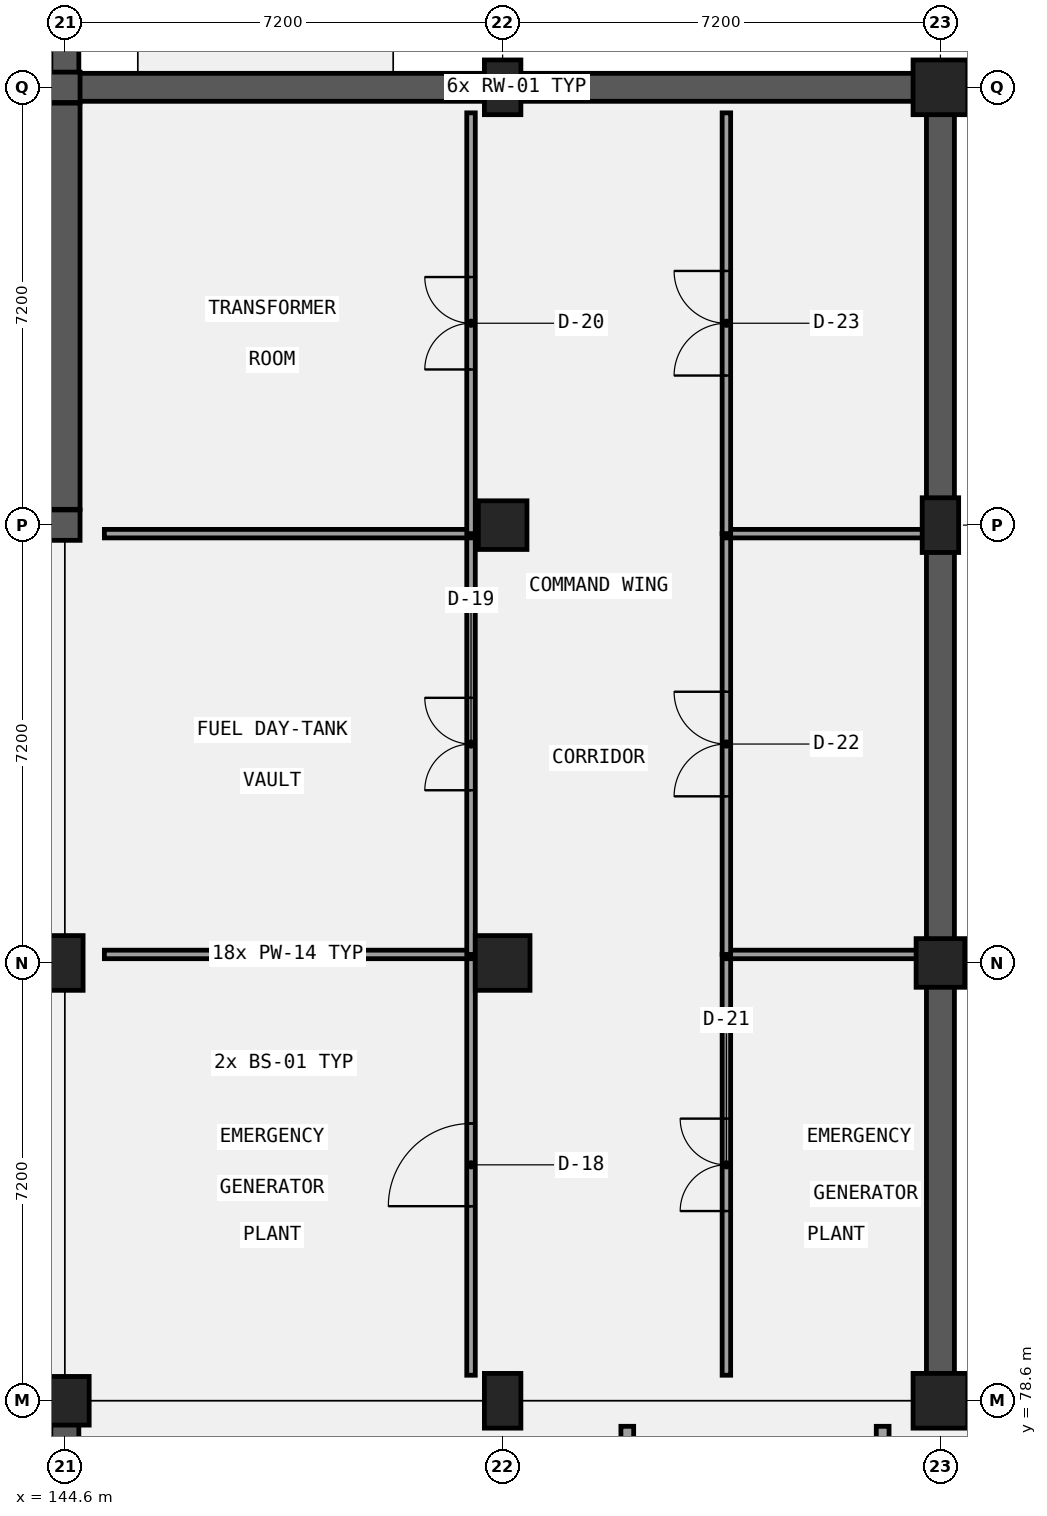
"""IFC4 building model, lengths in metres.
Left out: names, types, materials, properties, quantities, classifications, styles, units other than length and angle.
Written with IfcOpenShell. Run it as: python <this file> out.ifc"""

import sys

from ifc_helpers import new_model, si_unit, direction, frame, frame_2d, origin, origin_2d, place, context, subcontext, project, spatial, rectangle, extrude, element, fill, save


model = new_model("IFC4")
c1 = context("Model", 3, precision=1e-05, world=origin(), true_north=direction((0.0, 1.0)))
c2 = subcontext(c1, "Body", "Model", "MODEL_VIEW")
j1 = project(units=[si_unit("LENGTHUNIT", "METRE"), si_unit("PLANEANGLEUNIT", "RADIAN")], contexts=[c1])
p1 = place(None, origin())
s1 = spatial("IfcSite", under=j1, at=p1, CompositionType="ELEMENT")
p2 = place(p1, origin())
s2 = spatial("IfcBuilding", under=s1, at=p2, CompositionType="ELEMENT")
p3 = place(p2, frame((0.0, 0.0, -8.4)))
s3 = spatial("IfcBuildingStorey", under=s2, at=p3, CompositionType="ELEMENT", Elevation=-8.4)
p4 = place(p3, frame((144.83, 78.6, 0.0), z_axis=(0.0, 0.0, 1.0), x_axis=(-1.0, 0.0, 0.0)))
e1 = element("IfcWall", 1, at=p4, inside=s3, PredefinedType="USERDEFINED", context=c2, shape_type="SweptSolid", body=[
    extrude(rectangle(XDim=36.46, YDim=0.46, at=frame_2d((18.23, 0.0))), origin(), (0.0, 0.0, 1.0), 2.9),
])
p5 = place(p3, frame((144.6, 113.78, 0.0), z_axis=(0.0, 0.0, 1.0), x_axis=(0.0, -1.0, 0.0)))
e2 = element("IfcWall", 2, at=p5, inside=s3, PredefinedType="USERDEFINED", context=c2, shape_type="SweptSolid", body=[
    extrude(rectangle(XDim=13.35, YDim=0.46, at=frame_2d((6.675, 0.0))), origin(), (0.0, 0.0, 1.0), 3.25),
])
p6 = place(p3, frame((144.83, 100.2, 0.0), z_axis=(0.0, 0.0, 1.0), x_axis=(1.0, 0.0, 0.0)))
e3 = element("IfcWall", 3, at=p6, inside=s3, PredefinedType="USERDEFINED", context=c2, shape_type="SweptSolid", body=[
    extrude(rectangle(XDim=14.4, YDim=0.46, at=frame_2d((7.2, 0.0))), origin(), (0.0, 0.0, 1.0), 2.9),
])
p7 = place(p3, frame((159.0, 99.98, 0.0), z_axis=(0.0, 0.0, 1.0), x_axis=(0.0, -1.0, 0.0)))
e4 = element("IfcWall", 4, at=p7, inside=s3, PredefinedType="USERDEFINED", context=c2, shape_type="SweptSolid", body=[
    extrude(rectangle(XDim=21.16, YDim=0.46, at=frame_2d((10.58, 0.0))), origin(), (0.0, 0.0, 1.0), 3.25),
])
p8 = place(p3, frame((158.77, 78.6, 0.0), z_axis=(0.0, 0.0, 1.0), x_axis=(1.0, 0.0, 0.0)))
e5 = element("IfcWall", 5, at=p8, inside=s3, PredefinedType="USERDEFINED", context=c2, shape_type="SweptSolid", body=[
    extrude(rectangle(XDim=7.66, YDim=0.46, at=frame_2d((3.83, 0.0))), origin(), (0.0, 0.0, 1.0), 3.05),
])
p9 = place(p3, frame((144.6, 35.62, 0.0), z_axis=(0.0, 0.0, 1.0), x_axis=(0.0, 1.0, 0.0)))
e6 = element("IfcWall", 6, at=p9, inside=s3, PredefinedType="USERDEFINED", context=c2, shape_type="SweptSolid", body=[
    extrude(rectangle(XDim=42.76, YDim=0.46, at=frame_2d((21.38, 0.0))), origin(), (0.0, 0.0, 1.0), 3.05),
])
p10 = place(p3, frame((129.95, 100.2, 0.0), z_axis=(0.0, 0.0, 1.0), x_axis=(1.0, 0.0, 0.0)))
e7 = element("IfcWall", 7, at=p10, inside=s3, PredefinedType="SHEAR", context=c2, shape_type="SweptSolid", body=[
    extrude(rectangle(XDim=14.9, YDim=0.5, at=frame_2d((7.45, 0.0))), origin(), (0.0, 0.0, 1.0), 4.2),
])
p11 = place(p3, frame((129.95, 93.0, 0.0), z_axis=(0.0, 0.0, 1.0), x_axis=(1.0, 0.0, 0.0)))
e8 = element("IfcWall", 8, at=p11, inside=s3, PredefinedType="SHEAR", context=c2, shape_type="SweptSolid", body=[
    extrude(rectangle(XDim=14.9, YDim=0.5, at=frame_2d((7.45, 0.0))), origin(), (0.0, 0.0, 1.0), 4.2),
])
p12 = place(p11, frame((3.8, 0.0, 0.0)))
e9 = element("IfcOpeningElement", 9, at=p12, cuts=e8, PredefinedType="OPENING", context=c2, shape_type="SweptSolid", body=[
    extrude(rectangle(XDim=1.3, YDim=2.2, at=frame_2d((0.65, 1.1))), frame((0.0, 0.26, 0.0), z_axis=(0.0, -1.0, 0.0), x_axis=(1.0, 0.0, 0.0)), (0.0, 0.0, 1.0), 0.52),
])
p13 = place(p11, frame((11.8, 0.0, 0.0)))
e10 = element("IfcOpeningElement", 10, at=p13, cuts=e8, PredefinedType="OPENING", context=c2, shape_type="SweptSolid", body=[
    extrude(rectangle(XDim=1.3, YDim=2.2, at=frame_2d((0.65, 1.1))), frame((0.0, 0.26, 0.0), z_axis=(0.0, -1.0, 0.0), x_axis=(1.0, 0.0, 0.0)), (0.0, 0.0, 1.0), 0.52),
])
p14 = place(p3, frame((144.6, 93.26, 0.0), z_axis=(0.0, 0.0, 1.0), x_axis=(0.0, 1.0, 0.0)))
e11 = element("IfcWall", 11, at=p14, inside=s3, PredefinedType="SHEAR", context=c2, shape_type="SweptSolid", body=[
    extrude(rectangle(XDim=6.68, YDim=0.5, at=frame_2d((3.34, 0.0))), origin(), (0.0, 0.0, 1.0), 4.2),
])
p15 = place(p3, frame((144.6, 78.6, 0.0), z_axis=(0.0, 0.0, 1.0), x_axis=(1.0, 0.0, 0.0)))
e12 = element("IfcColumn", 12, at=p15, inside=s3, PredefinedType="COLUMN", context=c2, shape_type="SweptSolid", body=[
    extrude(rectangle(XDim=0.8, YDim=0.8, at=origin_2d()), origin(), (0.0, 0.0, 1.0), 4.2),
])
for number, where, z_axis, x_axis in (
    (13, (144.6, 85.8, 0.0), (0.0, 0.0, 1.0), (1.0, 0.0, 0.0)),
    (14, (151.8, 78.6, 0.0), (0.0, 0.0, 1.0), (1.0, 0.0, 0.0)),
):
    element("IfcColumn", number, at=place(p3, frame(where, z_axis=z_axis, x_axis=x_axis)), inside=s3, PredefinedType="COLUMN", context=c2, shape_type="SweptSolid", body=[
        extrude(rectangle(XDim=0.6, YDim=0.9, at=origin_2d()), origin(), (0.0, 0.0, 1.0), 4.2),
    ])
p16 = place(p3, frame((151.8, 85.8, 0.0), z_axis=(0.0, 0.0, 1.0), x_axis=(1.0, 0.0, 0.0)))
e15 = element("IfcColumn", 15, at=p16, inside=s3, PredefinedType="COLUMN", context=c2, shape_type="SweptSolid", body=[
    extrude(rectangle(XDim=0.9, YDim=0.9, at=origin_2d()), origin(), (0.0, 0.0, 1.0), 4.2),
])
p17 = place(p3, frame((151.8, 93.0, 0.0), z_axis=(0.0, 0.0, 1.0), x_axis=(1.0, 0.0, 0.0)))
e16 = element("IfcColumn", 16, at=p17, inside=s3, PredefinedType="COLUMN", context=c2, shape_type="SweptSolid", body=[
    extrude(rectangle(XDim=0.8, YDim=0.8, at=origin_2d()), origin(), (0.0, 0.0, 1.0), 4.2),
])
p18 = place(p3, frame((151.8, 100.2, 0.0), z_axis=(0.0, 0.0, 1.0), x_axis=(1.0, 0.0, 0.0)))
e17 = element("IfcColumn", 17, at=p18, inside=s3, PredefinedType="COLUMN", context=c2, shape_type="SweptSolid", body=[
    extrude(rectangle(XDim=0.6, YDim=0.9, at=origin_2d()), origin(), (0.0, 0.0, 1.0), 4.2),
])
p19 = place(p3, frame((159.0, 78.6, 0.0), z_axis=(0.0, 0.0, 1.0), x_axis=(1.0, 0.0, 0.0)))
e18 = element("IfcColumn", 18, at=p19, inside=s3, PredefinedType="COLUMN", context=c2, shape_type="SweptSolid", body=[
    extrude(rectangle(XDim=0.9, YDim=0.9, at=origin_2d()), origin(), (0.0, 0.0, 1.0), 4.2),
])
p20 = place(p3, frame((159.0, 85.8, 0.0), z_axis=(0.0, 0.0, 1.0), x_axis=(1.0, 0.0, 0.0)))
e19 = element("IfcColumn", 19, at=p20, inside=s3, PredefinedType="COLUMN", context=c2, shape_type="SweptSolid", body=[
    extrude(rectangle(XDim=0.8, YDim=0.8, at=origin_2d()), origin(), (0.0, 0.0, 1.0), 4.2),
])
p21 = place(p3, frame((159.0, 93.0, 0.0), z_axis=(0.0, 0.0, 1.0), x_axis=(1.0, 0.0, 0.0)))
e20 = element("IfcColumn", 20, at=p21, inside=s3, PredefinedType="COLUMN", context=c2, shape_type="SweptSolid", body=[
    extrude(rectangle(XDim=0.6, YDim=0.9, at=origin_2d()), origin(), (0.0, 0.0, 1.0), 4.2),
])
p22 = place(p3, frame((159.0, 100.2, 0.0), z_axis=(0.0, 0.0, 1.0), x_axis=(1.0, 0.0, 0.0)))
e21 = element("IfcColumn", 21, at=p22, inside=s3, PredefinedType="COLUMN", context=c2, shape_type="SweptSolid", body=[
    extrude(rectangle(XDim=0.9, YDim=0.9, at=origin_2d()), origin(), (0.0, 0.0, 1.0), 4.2),
])
p23 = place(p3, frame((151.28, 79.02, 0.0), z_axis=(0.0, 0.0, 1.0), x_axis=(0.0, 1.0, 0.0)))
e22 = element("IfcWall", 22, at=p23, inside=s3, PredefinedType="PARTITIONING", context=c2, shape_type="SweptSolid", body=[
    extrude(rectangle(XDim=6.92, YDim=0.14, at=frame_2d((3.46, 0.0))), origin(), (0.0, 0.0, 1.0), 3.9),
])
p24 = place(p23, frame((2.78, 0.0, 0.0)))
e23 = element("IfcOpeningElement", 23, at=p24, cuts=e22, PredefinedType="OPENING", context=c2, shape_type="SweptSolid", body=[
    extrude(rectangle(XDim=1.36, YDim=2.35, at=frame_2d((0.68, 1.175))), frame((0.0, 0.08, 0.0), z_axis=(0.0, -1.0, 0.0), x_axis=(1.0, 0.0, 0.0)), (0.0, 0.0, 1.0), 0.16),
])
p25 = place(p3, frame((145.25, 85.94, 0.0), z_axis=(0.0, 0.0, 1.0), x_axis=(1.0, 0.0, 0.0)))
e24 = element("IfcWall", 24, at=p25, inside=s3, PredefinedType="PARTITIONING", context=c2, shape_type="SweptSolid", body=[
    extrude(rectangle(XDim=6.03, YDim=0.14, at=frame_2d((3.015, 0.0))), origin(), (0.0, 0.0, 1.0), 3.1),
])
p26 = place(p3, frame((151.28, 85.94, 0.0), z_axis=(0.0, 0.0, 1.0), x_axis=(0.0, 1.0, 0.0)))
e25 = element("IfcWall", 25, at=p26, inside=s3, PredefinedType="PARTITIONING", context=c2, shape_type="SweptSolid", body=[
    extrude(rectangle(XDim=6.92, YDim=0.14, at=frame_2d((3.46, 0.0))), origin(), (0.0, 0.0, 1.0), 3.9),
])
p27 = place(p26, frame((2.7, 0.0, 0.0)))
e26 = element("IfcOpeningElement", 26, at=p27, cuts=e25, PredefinedType="OPENING", context=c2, shape_type="SweptSolid", body=[
    extrude(rectangle(XDim=1.52, YDim=2.1, at=frame_2d((0.76, 1.05))), frame((0.0, 0.08, 0.0), z_axis=(0.0, -1.0, 0.0), x_axis=(1.0, 0.0, 0.0)), (0.0, 0.0, 1.0), 0.16),
])
p28 = place(p3, frame((145.25, 92.86, 0.0), z_axis=(0.0, 0.0, 1.0), x_axis=(1.0, 0.0, 0.0)))
e27 = element("IfcWall", 27, at=p28, inside=s3, PredefinedType="PARTITIONING", context=c2, shape_type="SweptSolid", body=[
    extrude(rectangle(XDim=6.03, YDim=0.14, at=frame_2d((3.015, 0.0))), origin(), (0.0, 0.0, 1.0), 3.05),
])
p29 = place(p3, frame((151.28, 92.86, 0.0), z_axis=(0.0, 0.0, 1.0), x_axis=(0.0, 1.0, 0.0)))
e28 = element("IfcWall", 28, at=p29, inside=s3, PredefinedType="PARTITIONING", context=c2, shape_type="SweptSolid", body=[
    extrude(rectangle(XDim=6.92, YDim=0.14, at=frame_2d((3.46, 0.0))), origin(), (0.0, 0.0, 1.0), 3.9),
])
p30 = place(p29, frame((2.7, 0.0, 0.0)))
e29 = element("IfcOpeningElement", 29, at=p30, cuts=e28, PredefinedType="OPENING", context=c2, shape_type="SweptSolid", body=[
    extrude(rectangle(XDim=1.52, YDim=2.22, at=frame_2d((0.76, 1.11))), frame((0.0, 0.08, 0.0), z_axis=(0.0, -1.0, 0.0), x_axis=(1.0, 0.0, 0.0)), (0.0, 0.0, 1.0), 0.16),
])
p31 = place(p3, frame((155.48, 79.02, 0.0), z_axis=(0.0, 0.0, 1.0), x_axis=(0.0, 1.0, 0.0)))
e30 = element("IfcWall", 30, at=p31, inside=s3, PredefinedType="PARTITIONING", context=c2, shape_type="SweptSolid", body=[
    extrude(rectangle(XDim=6.92, YDim=0.14, at=frame_2d((3.46, 0.0))), origin(), (0.0, 0.0, 1.0), 3.9),
])
p32 = place(p31, frame((2.7, 0.0, 0.0)))
e31 = element("IfcOpeningElement", 31, at=p32, cuts=e30, PredefinedType="OPENING", context=c2, shape_type="SweptSolid", body=[
    extrude(rectangle(XDim=1.52, YDim=2.35, at=frame_2d((0.76, 1.175))), frame((0.0, 0.08, 0.0), z_axis=(0.0, -1.0, 0.0), x_axis=(1.0, 0.0, 0.0)), (0.0, 0.0, 1.0), 0.16),
])
p33 = place(p3, frame((155.48, 85.94, 0.0), z_axis=(0.0, 0.0, 1.0), x_axis=(1.0, 0.0, 0.0)))
e32 = element("IfcWall", 32, at=p33, inside=s3, PredefinedType="PARTITIONING", context=c2, shape_type="SweptSolid", body=[
    extrude(rectangle(XDim=3.34, YDim=0.14, at=frame_2d((1.67, 0.0))), origin(), (0.0, 0.0, 1.0), 3.05),
])
p34 = place(p3, frame((155.48, 85.94, 0.0), z_axis=(0.0, 0.0, 1.0), x_axis=(0.0, 1.0, 0.0)))
e33 = element("IfcWall", 33, at=p34, inside=s3, PredefinedType="PARTITIONING", context=c2, shape_type="SweptSolid", body=[
    extrude(rectangle(XDim=6.92, YDim=0.14, at=frame_2d((3.46, 0.0))), origin(), (0.0, 0.0, 1.0), 3.9),
])
p35 = place(p34, frame((2.6, 0.0, 0.0)))
e34 = element("IfcOpeningElement", 34, at=p35, cuts=e33, PredefinedType="OPENING", context=c2, shape_type="SweptSolid", body=[
    extrude(rectangle(XDim=1.72, YDim=2.1, at=frame_2d((0.86, 1.05))), frame((0.0, 0.08, 0.0), z_axis=(0.0, -1.0, 0.0), x_axis=(1.0, 0.0, 0.0)), (0.0, 0.0, 1.0), 0.16),
])
p36 = place(p3, frame((155.48, 92.86, 0.0), z_axis=(0.0, 0.0, 1.0), x_axis=(1.0, 0.0, 0.0)))
e35 = element("IfcWall", 35, at=p36, inside=s3, PredefinedType="PARTITIONING", context=c2, shape_type="SweptSolid", body=[
    extrude(rectangle(XDim=3.34, YDim=0.14, at=frame_2d((1.67, 0.0))), origin(), (0.0, 0.0, 1.0), 3.0),
])
p37 = place(p3, frame((155.48, 92.86, 0.0), z_axis=(0.0, 0.0, 1.0), x_axis=(0.0, 1.0, 0.0)))
e36 = element("IfcWall", 36, at=p37, inside=s3, PredefinedType="PARTITIONING", context=c2, shape_type="SweptSolid", body=[
    extrude(rectangle(XDim=6.92, YDim=0.14, at=frame_2d((3.46, 0.0))), origin(), (0.0, 0.0, 1.0), 3.9),
])
p38 = place(p37, frame((2.6, 0.0, 0.0)))
e37 = element("IfcOpeningElement", 37, at=p38, cuts=e36, PredefinedType="OPENING", context=c2, shape_type="SweptSolid", body=[
    extrude(rectangle(XDim=1.72, YDim=2.22, at=frame_2d((0.86, 1.11))), frame((0.0, 0.08, 0.0), z_axis=(0.0, -1.0, 0.0), x_axis=(1.0, 0.0, 0.0)), (0.0, 0.0, 1.0), 0.16),
])
p39 = place(p3, frame((153.85, 71.248, 0.0), z_axis=(0.0, 0.0, 1.0), x_axis=(0.0, 1.0, 0.0)))
e38 = element("IfcWall", 38, at=p39, inside=s3, PredefinedType="PARTITIONING", context=c2, shape_type="SweptSolid", body=[
    extrude(rectangle(XDim=6.932, YDim=0.21, at=frame_2d((3.466, 0.0))), origin(), (0.0, 0.0, 1.0), 3.9),
])
p40 = place(p39, frame((3.006, 0.0, 0.0)))
e39 = element("IfcOpeningElement", 39, at=p40, cuts=e38, PredefinedType="OPENING", context=c2, shape_type="SweptSolid", body=[
    extrude(rectangle(XDim=0.92, YDim=2.35, at=frame_2d((0.46, 1.175))), frame((0.0, 0.115, 0.0), z_axis=(0.0, -1.0, 0.0), x_axis=(1.0, 0.0, 0.0)), (0.0, 0.0, 1.0), 0.23),
])
p41 = place(p3, frame((158.05, 72.634, 0.0), z_axis=(0.0, 0.0, 1.0), x_axis=(0.0, 1.0, 0.0)))
e40 = element("IfcWall", 40, at=p41, inside=s3, PredefinedType="PARTITIONING", context=c2, shape_type="SweptSolid", body=[
    extrude(rectangle(XDim=5.546, YDim=0.21, at=frame_2d((2.773, 0.0))), origin(), (0.0, 0.0, 1.0), 3.9),
])
p42 = place(p41, frame((2.253, 0.0, 0.0)))
e41 = element("IfcOpeningElement", 41, at=p42, cuts=e40, PredefinedType="OPENING", context=c2, shape_type="SweptSolid", body=[
    extrude(rectangle(XDim=1.04, YDim=2.1, at=frame_2d((0.52, 1.05))), frame((0.0, 0.115, 0.0), z_axis=(0.0, -1.0, 0.0), x_axis=(1.0, 0.0, 0.0)), (0.0, 0.0, 1.0), 0.23),
])
p43 = place(p24, frame((1.36, 0.0, 0.0), z_axis=(0.0, 0.0, 1.0), x_axis=(-1.0, 0.0, 0.0)))
e42 = element("IfcDoor", 42, at=p43, inside=s3, OperationType="SINGLE_SWING_LEFT", PredefinedType="DOOR", context=c2, shape_type="SweptSolid", body=[
    extrude(rectangle(XDim=1.36, YDim=2.35, at=frame_2d((0.68, 1.175))), frame((0.0, 0.025, 0.0), z_axis=(0.0, -1.0, 0.0), x_axis=(1.0, 0.0, 0.0)), (0.0, 0.0, 1.0), 0.05),
])
fill(e23, e42)
p44 = place(p27, frame((1.52, 0.0, 0.0), z_axis=(0.0, 0.0, 1.0), x_axis=(-1.0, 0.0, 0.0)))
e43 = element("IfcDoor", 43, at=p44, inside=s3, OperationType="DOUBLE_DOOR_SINGLE_SWING", PredefinedType="DOOR", context=c2, shape_type="SweptSolid", body=[
    extrude(rectangle(XDim=1.52, YDim=2.1, at=frame_2d((0.76, 1.05))), frame((0.0, 0.025, 0.0), z_axis=(0.0, -1.0, 0.0), x_axis=(1.0, 0.0, 0.0)), (0.0, 0.0, 1.0), 0.05),
])
fill(e26, e43)
p45 = place(p30, frame((1.52, 0.0, 0.0), z_axis=(0.0, 0.0, 1.0), x_axis=(-1.0, 0.0, 0.0)))
e44 = element("IfcDoor", 44, at=p45, inside=s3, OperationType="DOUBLE_DOOR_SINGLE_SWING", PredefinedType="DOOR", context=c2, shape_type="SweptSolid", body=[
    extrude(rectangle(XDim=1.52, YDim=2.22, at=frame_2d((0.76, 1.11))), frame((0.0, 0.025, 0.0), z_axis=(0.0, -1.0, 0.0), x_axis=(1.0, 0.0, 0.0)), (0.0, 0.0, 1.0), 0.05),
])
fill(e29, e44)
p46 = place(p32, origin())
e45 = element("IfcDoor", 45, at=p46, inside=s3, OperationType="DOUBLE_DOOR_SINGLE_SWING", PredefinedType="DOOR", context=c2, shape_type="SweptSolid", body=[
    extrude(rectangle(XDim=1.52, YDim=2.35, at=frame_2d((0.76, 1.175))), frame((0.0, 0.025, 0.0), z_axis=(0.0, -1.0, 0.0), x_axis=(1.0, 0.0, 0.0)), (0.0, 0.0, 1.0), 0.05),
])
fill(e31, e45)
p47 = place(p35, origin())
e46 = element("IfcDoor", 46, at=p47, inside=s3, OperationType="DOUBLE_DOOR_SINGLE_SWING", PredefinedType="DOOR", context=c2, shape_type="SweptSolid", body=[
    extrude(rectangle(XDim=1.72, YDim=2.1, at=frame_2d((0.86, 1.05))), frame((0.0, 0.025, 0.0), z_axis=(0.0, -1.0, 0.0), x_axis=(1.0, 0.0, 0.0)), (0.0, 0.0, 1.0), 0.05),
])
fill(e34, e46)
p48 = place(p38, origin())
e47 = element("IfcDoor", 47, at=p48, inside=s3, OperationType="DOUBLE_DOOR_SINGLE_SWING", PredefinedType="DOOR", context=c2, shape_type="SweptSolid", body=[
    extrude(rectangle(XDim=1.72, YDim=2.22, at=frame_2d((0.86, 1.11))), frame((0.0, 0.025, 0.0), z_axis=(0.0, -1.0, 0.0), x_axis=(1.0, 0.0, 0.0)), (0.0, 0.0, 1.0), 0.05),
])
fill(e37, e47)
save(model, sys.argv[1])
